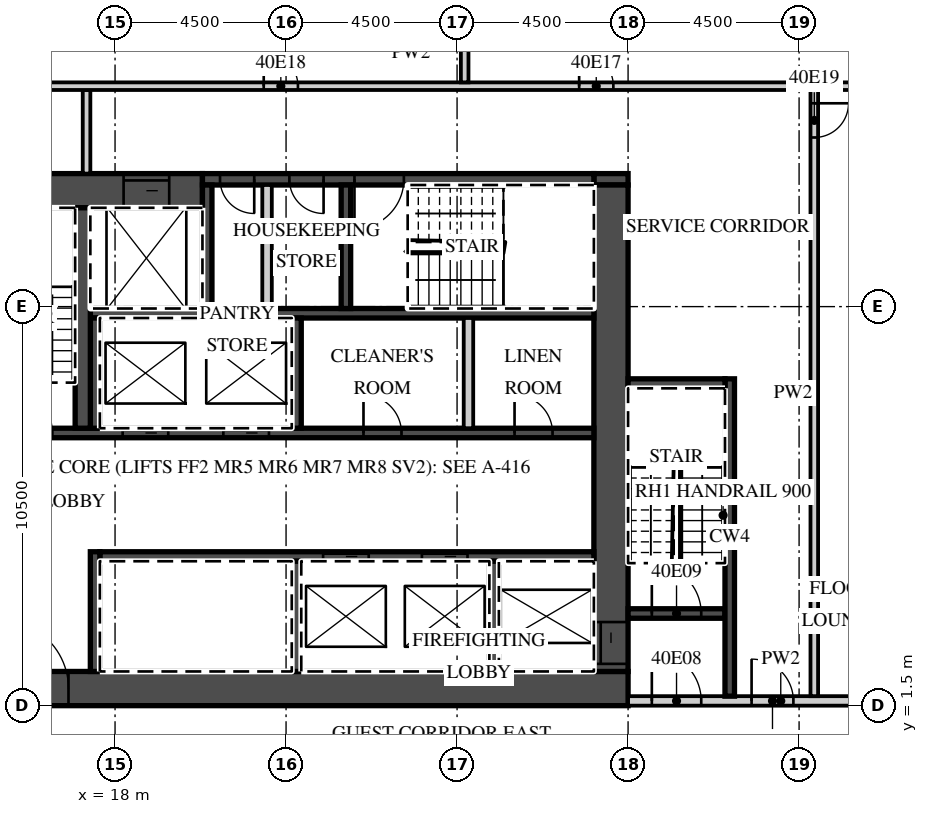
"""IFC4 building model, lengths in metres.
Left out: names, types, materials, properties, quantities, classifications, styles, units other than length and angle.
Written with IfcOpenShell. Run it as: python <this file> out.ifc"""

import sys

from ifc_helpers import new_model, si_unit, direction, frame, frame_2d, origin, place, context, subcontext, project, spatial, rectangle, extrude, element, fill, save


model = new_model("IFC4")
c1 = context("Model", 3, precision=1e-05, world=origin(), true_north=direction((0.0, 1.0)))
c2 = subcontext(c1, "Body", "Model", "MODEL_VIEW")
j1 = project(units=[si_unit("LENGTHUNIT", "METRE"), si_unit("PLANEANGLEUNIT", "RADIAN")], contexts=[c1])
p1 = place(None, origin())
s1 = spatial("IfcSite", under=j1, at=p1, CompositionType="ELEMENT")
p2 = place(p1, origin())
s2 = spatial("IfcBuilding", under=s1, at=p2, CompositionType="ELEMENT")
p3 = place(p2, frame((0.0, 0.0, 173.5)))
s3 = spatial("IfcBuildingStorey", under=s2, at=p3, CompositionType="ELEMENT", Elevation=173.5)
p4 = place(p3, frame((13.5, 1.95, 0.0), z_axis=(0.0, 0.0, 1.0), x_axis=(1.0, 0.0, 0.0)))
e1 = element("IfcWall", 1, at=p4, inside=s3, PredefinedType="SHEAR", context=c2, shape_type="SweptSolid", body=[
    extrude(rectangle(XDim=18.0, YDim=0.9, at=frame_2d((9.0, 0.0))), origin(), (0.0, 0.0, 1.0), 3.02),
])
p5 = place(p4, frame((1.475, 0.0, 0.0)))
e2 = element("IfcOpeningElement", 2, at=p5, cuts=e1, PredefinedType="OPENING", context=c2, shape_type="SweptSolid", body=[
    extrude(rectangle(XDim=1.8, YDim=2.1, at=frame_2d((0.9, 1.05))), frame((0.0, 0.46, 0.0), z_axis=(0.0, -1.0, 0.0), x_axis=(1.0, 0.0, 0.0)), (0.0, 0.0, 1.0), 0.92),
])
p6 = place(p3, frame((13.5, 15.05, 0.0), z_axis=(0.0, 0.0, 1.0), x_axis=(1.0, 0.0, 0.0)))
e3 = element("IfcWall", 3, at=p6, inside=s3, PredefinedType="SHEAR", context=c2, shape_type="SweptSolid", body=[
    extrude(rectangle(XDim=6.8, YDim=0.9, at=frame_2d((3.4, 0.0))), origin(), (0.0, 0.0, 1.0), 3.02),
])
p7 = place(p6, frame((4.725, 0.0, 0.0)))
e4 = element("IfcOpeningElement", 4, at=p7, cuts=e3, PredefinedType="OPENING", context=c2, shape_type="SweptSolid", body=[
    extrude(rectangle(XDim=1.2, YDim=2.1, at=frame_2d((0.6, 1.05))), frame((0.0, 0.46, 0.0), z_axis=(0.0, -1.0, 0.0), x_axis=(1.0, 0.0, 0.0)), (0.0, 0.0, 1.0), 0.92),
])
p8 = place(p3, frame((30.6, 15.35, 0.0), z_axis=(0.0, 0.0, 1.0), x_axis=(1.0, 0.0, 0.0)))
e5 = element("IfcWall", 5, at=p8, inside=s3, PredefinedType="SHEAR", context=c2, shape_type="SweptSolid", body=[
    extrude(rectangle(XDim=0.9, YDim=0.3, at=frame_2d((0.45, 0.0))), origin(), (0.0, 0.0, 1.0), 3.02),
])
p9 = place(p3, frame((20.3, 15.35, 0.0), z_axis=(0.0, 0.0, 1.0), x_axis=(1.0, 0.0, 0.0)))
e6 = element("IfcWall", 6, at=p9, inside=s3, PredefinedType="SHEAR", context=c2, shape_type="SweptSolid", body=[
    extrude(rectangle(XDim=10.3, YDim=0.3, at=frame_2d((5.15, 0.0))), origin(), (0.0, 0.0, 1.0), 3.02),
])
p10 = place(p9, frame((4.0, 0.0, 0.0)))
e7 = element("IfcOpeningElement", 7, at=p10, cuts=e6, PredefinedType="OPENING", context=c2, shape_type="SweptSolid", body=[
    extrude(rectangle(XDim=1.3, YDim=2.1, at=frame_2d((0.65, 1.05))), frame((0.0, 0.16, 0.0), z_axis=(0.0, -1.0, 0.0), x_axis=(1.0, 0.0, 0.0)), (0.0, 0.0, 1.0), 0.32),
])
p11 = place(p9, frame((2.288, 0.0, 0.0)))
e8 = element("IfcOpeningElement", 8, at=p11, cuts=e6, PredefinedType="OPENING", context=c2, shape_type="SweptSolid", body=[
    extrude(rectangle(XDim=0.9, YDim=2.1, at=frame_2d((0.45, 1.05))), frame((0.0, 0.16, 0.0), z_axis=(0.0, -1.0, 0.0), x_axis=(1.0, 0.0, 0.0)), (0.0, 0.0, 1.0), 0.32),
])
p12 = place(p9, frame((0.462, 0.0, 0.0)))
e9 = element("IfcOpeningElement", 9, at=p12, cuts=e6, PredefinedType="OPENING", context=c2, shape_type="SweptSolid", body=[
    extrude(rectangle(XDim=0.9, YDim=2.1, at=frame_2d((0.45, 1.05))), frame((0.0, 0.16, 0.0), z_axis=(0.0, -1.0, 0.0), x_axis=(1.0, 0.0, 0.0)), (0.0, 0.0, 1.0), 0.32),
])
p13 = place(p3, frame((31.05, 2.4, 0.0), z_axis=(0.0, 0.0, 1.0), x_axis=(0.0, 1.0, 0.0)))
e10 = element("IfcWall", 10, at=p13, inside=s3, PredefinedType="SHEAR", context=c2, shape_type="SweptSolid", body=[
    extrude(rectangle(XDim=12.8, YDim=0.9, at=frame_2d((6.4, 0.0))), origin(), (0.0, 0.0, 1.0), 3.02),
])
p14 = place(p13, frame((0.2, 0.0, 0.0)))
e11 = element("IfcOpeningElement", 11, at=p14, cuts=e10, PredefinedType="OPENING", context=c2, shape_type="SweptSolid", body=[
    extrude(rectangle(XDim=1.1, YDim=2.1, at=frame_2d((0.55, 1.05))), frame((0.0, 0.46, 0.0), z_axis=(0.0, -1.0, 0.0), x_axis=(1.0, 0.0, 0.0)), (0.0, 0.0, 1.0), 0.92),
])
p15 = place(p3, frame((17.6, 5.425, 0.0), z_axis=(0.0, 0.0, 1.0), x_axis=(1.0, 0.0, 0.0)))
e12 = element("IfcWall", 12, at=p15, inside=s3, PredefinedType="SHEAR", context=c2, shape_type="SweptSolid", body=[
    extrude(rectangle(XDim=13.0, YDim=0.25, at=frame_2d((6.5, 0.0))), origin(), (0.0, 0.0, 1.0), 3.02),
])
p16 = place(p15, frame((8.475, 0.0, 0.0)))
e13 = element("IfcOpeningElement", 13, at=p16, cuts=e12, PredefinedType="OPENING", context=c2, shape_type="SweptSolid", body=[
    extrude(rectangle(XDim=1.2, YDim=2.1, at=frame_2d((0.6, 1.05))), frame((0.0, 0.135, 0.0), z_axis=(0.0, -1.0, 0.0), x_axis=(1.0, 0.0, 0.0)), (0.0, 0.0, 1.0), 0.27),
])
p17 = place(p15, frame((5.875, 0.0, 0.0)))
e14 = element("IfcOpeningElement", 14, at=p17, cuts=e12, PredefinedType="OPENING", context=c2, shape_type="SweptSolid", body=[
    extrude(rectangle(XDim=1.2, YDim=2.1, at=frame_2d((0.6, 1.05))), frame((0.0, 0.135, 0.0), z_axis=(0.0, -1.0, 0.0), x_axis=(1.0, 0.0, 0.0)), (0.0, 0.0, 1.0), 0.27),
])
p18 = place(p3, frame((17.475, 2.4, 0.0), z_axis=(0.0, 0.0, 1.0), x_axis=(0.0, 1.0, 0.0)))
e15 = element("IfcWall", 15, at=p18, inside=s3, PredefinedType="SHEAR", context=c2, shape_type="SweptSolid", body=[
    extrude(rectangle(XDim=3.15, YDim=0.25, at=frame_2d((1.575, 0.0))), origin(), (0.0, 0.0, 1.0), 3.02),
])
for number, where, z_axis, x_axis in (
    (16, (27.975, 2.4, 0.0), (0.0, 0.0, 1.0), (0.0, 1.0, 0.0)),
    (17, (22.775, 2.4, 0.0), (0.0, 0.0, 1.0), (0.0, 1.0, 0.0)),
):
    element("IfcWall", number, at=place(p3, frame(where, z_axis=z_axis, x_axis=x_axis)), inside=s3, PredefinedType="SHEAR", context=c2, shape_type="SweptSolid", body=[
        extrude(rectangle(XDim=2.9, YDim=0.25, at=frame_2d((1.45, 0.0))), origin(), (0.0, 0.0, 1.0), 3.02),
    ])
p19 = place(p3, frame((14.4, 8.675, 0.0), z_axis=(0.0, 0.0, 1.0), x_axis=(1.0, 0.0, 0.0)))
e18 = element("IfcWall", 18, at=p19, inside=s3, PredefinedType="SHEAR", context=c2, shape_type="SweptSolid", body=[
    extrude(rectangle(XDim=16.2, YDim=0.25, at=frame_2d((8.1, 0.0))), origin(), (0.0, 0.0, 1.0), 3.02),
])
p20 = place(p19, frame((6.45, 0.0, 0.0)))
e19 = element("IfcOpeningElement", 19, at=p20, cuts=e18, PredefinedType="OPENING", context=c2, shape_type="SweptSolid", body=[
    extrude(rectangle(XDim=1.2, YDim=2.1, at=frame_2d((0.6, 1.05))), frame((0.0, 0.135, 0.0), z_axis=(0.0, -1.0, 0.0), x_axis=(1.0, 0.0, 0.0)), (0.0, 0.0, 1.0), 0.27),
])
p21 = place(p19, frame((3.8, 0.0, 0.0)))
e20 = element("IfcOpeningElement", 20, at=p21, cuts=e18, PredefinedType="OPENING", context=c2, shape_type="SweptSolid", body=[
    extrude(rectangle(XDim=1.2, YDim=2.1, at=frame_2d((0.6, 1.05))), frame((0.0, 0.135, 0.0), z_axis=(0.0, -1.0, 0.0), x_axis=(1.0, 0.0, 0.0)), (0.0, 0.0, 1.0), 0.27),
])
p22 = place(p19, frame((0.65, 0.0, 0.0)))
e21 = element("IfcOpeningElement", 21, at=p22, cuts=e18, PredefinedType="OPENING", context=c2, shape_type="SweptSolid", body=[
    extrude(rectangle(XDim=1.3, YDim=2.1, at=frame_2d((0.65, 1.05))), frame((0.0, 0.135, 0.0), z_axis=(0.0, -1.0, 0.0), x_axis=(1.0, 0.0, 0.0)), (0.0, 0.0, 1.0), 0.27),
])
p23 = place(p19, frame((14.113, 0.0, 0.0)))
e22 = element("IfcOpeningElement", 22, at=p23, cuts=e18, PredefinedType="OPENING", context=c2, shape_type="SweptSolid", body=[
    extrude(rectangle(XDim=1.0, YDim=2.1, at=frame_2d((0.5, 1.05))), frame((0.0, 0.135, 0.0), z_axis=(0.0, -1.0, 0.0), x_axis=(1.0, 0.0, 0.0)), (0.0, 0.0, 1.0), 0.27),
])
p24 = place(p19, frame((10.137, 0.0, 0.0)))
e23 = element("IfcOpeningElement", 23, at=p24, cuts=e18, PredefinedType="OPENING", context=c2, shape_type="SweptSolid", body=[
    extrude(rectangle(XDim=1.0, YDim=2.1, at=frame_2d((0.5, 1.05))), frame((0.0, 0.135, 0.0), z_axis=(0.0, -1.0, 0.0), x_axis=(1.0, 0.0, 0.0)), (0.0, 0.0, 1.0), 0.27),
])
p25 = place(p3, frame((17.35, 11.825, 0.0), z_axis=(0.0, 0.0, 1.0), x_axis=(1.0, 0.0, 0.0)))
e24 = element("IfcWall", 24, at=p25, inside=s3, PredefinedType="SHEAR", context=c2, shape_type="SweptSolid", body=[
    extrude(rectangle(XDim=13.25, YDim=0.25, at=frame_2d((6.625, 0.0))), origin(), (0.0, 0.0, 1.0), 3.02),
])
for number, where, z_axis, x_axis in (
    (25, (17.475, 8.8, 0.0), (0.0, 0.0, 1.0), (0.0, 1.0, 0.0)),
    (26, (22.775, 8.8, 0.0), (0.0, 0.0, 1.0), (0.0, 1.0, 0.0)),
):
    element("IfcWall", number, at=place(p3, frame(where, z_axis=z_axis, x_axis=x_axis)), inside=s3, PredefinedType="SHEAR", context=c2, shape_type="SweptSolid", body=[
        extrude(rectangle(XDim=2.9, YDim=0.25, at=frame_2d((1.45, 0.0))), origin(), (0.0, 0.0, 1.0), 3.02),
    ])
p26 = place(p3, frame((27.3, 8.8, 0.0), z_axis=(0.0, 0.0, 1.0), x_axis=(0.0, 1.0, 0.0)))
e27 = element("IfcWall", 27, at=p26, inside=s3, PredefinedType="PARTITIONING", context=c2, shape_type="SweptSolid", body=[
    extrude(rectangle(XDim=2.9, YDim=0.25, at=frame_2d((1.45, 0.0))), origin(), (0.0, 0.0, 1.0), 3.02),
])
p27 = place(p3, frame((17.15, 8.8, 0.0), z_axis=(0.0, 0.0, 1.0), x_axis=(0.0, 1.0, 0.0)))
e28 = element("IfcWall", 28, at=p27, inside=s3, PredefinedType="SHEAR", context=c2, shape_type="SweptSolid", body=[
    extrude(rectangle(XDim=5.8, YDim=0.4, at=frame_2d((2.9, 0.0))), origin(), (0.0, 0.0, 1.0), 3.02),
])
for number, where, z_axis, x_axis in (
    (29, (20.425, 11.95, 0.0), (0.0, 0.0, 1.0), (0.0, 1.0, 0.0)),
    (30, (24.075, 11.95, 0.0), (0.0, 0.0, 1.0), (0.0, 1.0, 0.0)),
):
    element("IfcWall", number, at=place(p3, frame(where, z_axis=z_axis, x_axis=x_axis)), inside=s3, PredefinedType="SHEAR", context=c2, shape_type="SweptSolid", body=[
        extrude(rectangle(XDim=3.25, YDim=0.25, at=frame_2d((1.625, 0.0))), origin(), (0.0, 0.0, 1.0), 3.02),
    ])
p28 = place(p3, frame((22.0, 11.95, 0.0), z_axis=(0.0, 0.0, 1.0), x_axis=(0.0, 1.0, 0.0)))
e31 = element("IfcWall", 31, at=p28, inside=s3, PredefinedType="PARTITIONING", context=c2, shape_type="SweptSolid", body=[
    extrude(rectangle(XDim=3.25, YDim=0.25, at=frame_2d((1.625, 0.0))), origin(), (0.0, 0.0, 1.0), 3.02),
])
p29 = place(p3, frame((31.5, 1.625, 0.0), z_axis=(0.0, 0.0, 1.0), x_axis=(1.0, 0.0, 0.0)))
e32 = element("IfcWall", 32, at=p29, inside=s3, PredefinedType="PARTITIONING", context=c2, shape_type="SweptSolid", body=[
    extrude(rectangle(XDim=8.035, YDim=0.25, at=frame_2d((4.018, 0.0))), origin(), (0.0, 0.0, 1.0), 3.02),
])
p30 = place(p29, frame((0.625, 0.0, 0.0)))
e33 = element("IfcOpeningElement", 33, at=p30, cuts=e32, PredefinedType="OPENING", context=c2, shape_type="SweptSolid", body=[
    extrude(rectangle(XDim=1.3, YDim=2.1, at=frame_2d((0.65, 1.05))), frame((0.0, 0.135, 0.0), z_axis=(0.0, -1.0, 0.0), x_axis=(1.0, 0.0, 0.0)), (0.0, 0.0, 1.0), 0.27),
])
p31 = place(p29, frame((3.25, 0.0, 0.0)))
e34 = element("IfcOpeningElement", 34, at=p31, cuts=e32, PredefinedType="OPENING", context=c2, shape_type="SweptSolid", body=[
    extrude(rectangle(XDim=1.1, YDim=2.1, at=frame_2d((0.55, 1.05))), frame((0.0, 0.135, 0.0), z_axis=(0.0, -1.0, 0.0), x_axis=(1.0, 0.0, 0.0)), (0.0, 0.0, 1.0), 0.27),
])
p32 = place(p3, frame((31.5, 3.925, 0.0), z_axis=(0.0, 0.0, 1.0), x_axis=(1.0, 0.0, 0.0)))
e35 = element("IfcWall", 35, at=p32, inside=s3, PredefinedType="SHEAR", context=c2, shape_type="SweptSolid", body=[
    extrude(rectangle(XDim=2.55, YDim=0.25, at=frame_2d((1.275, 0.0))), origin(), (0.0, 0.0, 1.0), 3.02),
])
p33 = place(p32, frame((0.625, 0.0, 0.0)))
e36 = element("IfcOpeningElement", 36, at=p33, cuts=e35, PredefinedType="OPENING", context=c2, shape_type="SweptSolid", body=[
    extrude(rectangle(XDim=1.3, YDim=2.1, at=frame_2d((0.65, 1.05))), frame((0.0, 0.135, 0.0), z_axis=(0.0, -1.0, 0.0), x_axis=(1.0, 0.0, 0.0)), (0.0, 0.0, 1.0), 0.27),
])
p34 = place(p3, frame((34.175, 1.75, 0.0), z_axis=(0.0, 0.0, 1.0), x_axis=(0.0, 1.0, 0.0)))
e37 = element("IfcWall", 37, at=p34, inside=s3, PredefinedType="SHEAR", context=c2, shape_type="SweptSolid", body=[
    extrude(rectangle(XDim=8.35, YDim=0.25, at=frame_2d((4.175, 0.0))), origin(), (0.0, 0.0, 1.0), 3.02),
])
p35 = place(p3, frame((31.5, 9.975, 0.0), z_axis=(0.0, 0.0, 1.0), x_axis=(1.0, 0.0, 0.0)))
e38 = element("IfcWall", 38, at=p35, inside=s3, PredefinedType="SHEAR", context=c2, shape_type="SweptSolid", body=[
    extrude(rectangle(XDim=2.55, YDim=0.25, at=frame_2d((1.275, 0.0))), origin(), (0.0, 0.0, 1.0), 3.02),
])
p36 = place(p3, frame((17.25, 15.5, 0.0), z_axis=(0.0, 0.0, 1.0), x_axis=(0.0, 1.0, 0.0)))
e39 = element("IfcWall", 39, at=p36, inside=s3, PredefinedType="PARTITIONING", context=c2, shape_type="SweptSolid", body=[
    extrude(rectangle(XDim=2.2, YDim=0.2, at=frame_2d((1.1, 0.0))), origin(), (0.0, 0.0, 1.0), 3.02),
])
p37 = place(p3, frame((36.4, 1.75, 0.0), z_axis=(0.0, 0.0, 1.0), x_axis=(0.0, 1.0, 0.0)))
e40 = element("IfcWall", 40, at=p37, inside=s3, PredefinedType="PARTITIONING", context=c2, shape_type="SweptSolid", body=[
    extrude(rectangle(XDim=15.95, YDim=0.2, at=frame_2d((7.975, 0.0))), origin(), (0.0, 0.0, 1.0), 3.02),
])
p38 = place(p37, frame((14.7, 0.0, 0.0)))
e41 = element("IfcOpeningElement", 41, at=p38, cuts=e40, PredefinedType="OPENING", context=c2, shape_type="SweptSolid", body=[
    extrude(rectangle(XDim=0.9, YDim=2.1, at=frame_2d((0.45, 1.05))), frame((0.0, 0.11, 0.0), z_axis=(0.0, -1.0, 0.0), x_axis=(1.0, 0.0, 0.0)), (0.0, 0.0, 1.0), 0.22),
])
p39 = place(p3, frame((13.6, 17.8, 0.0), z_axis=(0.0, 0.0, 1.0), x_axis=(1.0, 0.0, 0.0)))
e42 = element("IfcWall", 42, at=p39, inside=s3, PredefinedType="PARTITIONING", context=c2, shape_type="SweptSolid", body=[
    extrude(rectangle(XDim=24.378, YDim=0.2, at=frame_2d((12.189, 0.0))), origin(), (0.0, 0.0, 1.0), 3.02),
])
p40 = place(p39, frame((16.613, 0.0, 0.0)))
e43 = element("IfcOpeningElement", 43, at=p40, cuts=e42, PredefinedType="OPENING", context=c2, shape_type="SweptSolid", body=[
    extrude(rectangle(XDim=0.9, YDim=2.1, at=frame_2d((0.45, 1.05))), frame((0.0, 0.11, 0.0), z_axis=(0.0, -1.0, 0.0), x_axis=(1.0, 0.0, 0.0)), (0.0, 0.0, 1.0), 0.22),
])
p41 = place(p39, frame((8.312, 0.0, 0.0)))
e44 = element("IfcOpeningElement", 44, at=p41, cuts=e42, PredefinedType="OPENING", context=c2, shape_type="SweptSolid", body=[
    extrude(rectangle(XDim=0.9, YDim=2.1, at=frame_2d((0.45, 1.05))), frame((0.0, 0.11, 0.0), z_axis=(0.0, -1.0, 0.0), x_axis=(1.0, 0.0, 0.0)), (0.0, 0.0, 1.0), 0.22),
])
p42 = place(p3, frame((27.2, 17.9, 0.0), z_axis=(0.0, 0.0, 1.0), x_axis=(0.0, 1.0, 0.0)))
e45 = element("IfcWall", 45, at=p42, inside=s3, PredefinedType="PARTITIONING", context=c2, shape_type="SweptSolid", body=[
    extrude(rectangle(XDim=5.01, YDim=0.2, at=frame_2d((2.505, 0.0))), origin(), (0.0, 0.0, 1.0), 3.02),
])
p43 = place(p20, origin())
e46 = element("IfcDoor", 46, at=p43, inside=s3, OperationType="SLIDING_TO_LEFT", PredefinedType="DOOR", context=c2, shape_type="SweptSolid", body=[
    extrude(rectangle(XDim=1.2, YDim=2.1, at=frame_2d((0.6, 1.05))), frame((0.0, 0.025, 0.0), z_axis=(0.0, -1.0, 0.0), x_axis=(1.0, 0.0, 0.0)), (0.0, 0.0, 1.0), 0.05),
])
fill(e19, e46)
p44 = place(p21, origin())
e47 = element("IfcDoor", 47, at=p44, inside=s3, OperationType="SLIDING_TO_RIGHT", PredefinedType="DOOR", context=c2, shape_type="SweptSolid", body=[
    extrude(rectangle(XDim=1.2, YDim=2.1, at=frame_2d((0.6, 1.05))), frame((0.0, 0.025, 0.0), z_axis=(0.0, -1.0, 0.0), x_axis=(1.0, 0.0, 0.0)), (0.0, 0.0, 1.0), 0.05),
])
fill(e20, e47)
p45 = place(p16, origin())
e48 = element("IfcDoor", 48, at=p45, inside=s3, OperationType="SLIDING_TO_LEFT", PredefinedType="DOOR", context=c2, shape_type="SweptSolid", body=[
    extrude(rectangle(XDim=1.2, YDim=2.1, at=frame_2d((0.6, 1.05))), frame((0.0, 0.025, 0.0), z_axis=(0.0, -1.0, 0.0), x_axis=(1.0, 0.0, 0.0)), (0.0, 0.0, 1.0), 0.05),
])
fill(e13, e48)
p46 = place(p17, origin())
e49 = element("IfcDoor", 49, at=p46, inside=s3, OperationType="SLIDING_TO_RIGHT", PredefinedType="DOOR", context=c2, shape_type="SweptSolid", body=[
    extrude(rectangle(XDim=1.2, YDim=2.1, at=frame_2d((0.6, 1.05))), frame((0.0, 0.025, 0.0), z_axis=(0.0, -1.0, 0.0), x_axis=(1.0, 0.0, 0.0)), (0.0, 0.0, 1.0), 0.05),
])
fill(e14, e49)
p47 = place(p7, origin())
e50 = element("IfcDoor", 50, at=p47, inside=s3, OperationType="SLIDING_TO_LEFT", PredefinedType="DOOR", context=c2, shape_type="SweptSolid", body=[
    extrude(rectangle(XDim=1.2, YDim=2.1, at=frame_2d((0.6, 1.05))), frame((0.0, 0.025, 0.0), z_axis=(0.0, -1.0, 0.0), x_axis=(1.0, 0.0, 0.0)), (0.0, 0.0, 1.0), 0.05),
])
fill(e4, e50)
p48 = place(p14, origin())
e51 = element("IfcDoor", 51, at=p48, inside=s3, OperationType="SLIDING_TO_LEFT", PredefinedType="DOOR", context=c2, shape_type="SweptSolid", body=[
    extrude(rectangle(XDim=1.1, YDim=2.1, at=frame_2d((0.55, 1.05))), frame((0.0, 0.025, 0.0), z_axis=(0.0, -1.0, 0.0), x_axis=(1.0, 0.0, 0.0)), (0.0, 0.0, 1.0), 0.05),
])
fill(e11, e51)
p49 = place(p5, origin())
e52 = element("IfcDoor", 52, at=p49, inside=s3, OperationType="DOUBLE_DOOR_DOUBLE_SWING", PredefinedType="DOOR", context=c2, shape_type="SweptSolid", body=[
    extrude(rectangle(XDim=1.8, YDim=2.1, at=frame_2d((0.9, 1.05))), frame((0.0, 0.025, 0.0), z_axis=(0.0, -1.0, 0.0), x_axis=(1.0, 0.0, 0.0)), (0.0, 0.0, 1.0), 0.05),
])
fill(e2, e52)
p50 = place(p30, origin())
e53 = element("IfcDoor", 53, at=p50, inside=s3, OperationType="SINGLE_SWING_LEFT", PredefinedType="DOOR", context=c2, shape_type="SweptSolid", body=[
    extrude(rectangle(XDim=1.3, YDim=2.1, at=frame_2d((0.65, 1.05))), frame((0.0, 0.025, 0.0), z_axis=(0.0, -1.0, 0.0), x_axis=(1.0, 0.0, 0.0)), (0.0, 0.0, 1.0), 0.05),
])
fill(e33, e53)
p51 = place(p33, origin())
e54 = element("IfcDoor", 54, at=p51, inside=s3, OperationType="SINGLE_SWING_LEFT", PredefinedType="DOOR", context=c2, shape_type="SweptSolid", body=[
    extrude(rectangle(XDim=1.3, YDim=2.1, at=frame_2d((0.65, 1.05))), frame((0.0, 0.025, 0.0), z_axis=(0.0, -1.0, 0.0), x_axis=(1.0, 0.0, 0.0)), (0.0, 0.0, 1.0), 0.05),
])
fill(e36, e54)
p52 = place(p31, origin())
e55 = element("IfcDoor", 55, at=p52, inside=s3, OperationType="SINGLE_SWING_LEFT", PredefinedType="DOOR", context=c2, shape_type="SweptSolid", body=[
    extrude(rectangle(XDim=1.1, YDim=2.1, at=frame_2d((0.55, 1.05))), frame((0.0, 0.025, 0.0), z_axis=(0.0, -1.0, 0.0), x_axis=(1.0, 0.0, 0.0)), (0.0, 0.0, 1.0), 0.05),
])
fill(e34, e55)
p53 = place(p10, origin())
e56 = element("IfcDoor", 56, at=p53, inside=s3, OperationType="SINGLE_SWING_LEFT", PredefinedType="DOOR", context=c2, shape_type="SweptSolid", body=[
    extrude(rectangle(XDim=1.3, YDim=2.1, at=frame_2d((0.65, 1.05))), frame((0.0, 0.025, 0.0), z_axis=(0.0, -1.0, 0.0), x_axis=(1.0, 0.0, 0.0)), (0.0, 0.0, 1.0), 0.05),
])
fill(e7, e56)
p54 = place(p11, origin())
e57 = element("IfcDoor", 57, at=p54, inside=s3, OperationType="SINGLE_SWING_RIGHT", PredefinedType="DOOR", context=c2, shape_type="SweptSolid", body=[
    extrude(rectangle(XDim=0.9, YDim=2.1, at=frame_2d((0.45, 1.05))), frame((0.0, 0.025, 0.0), z_axis=(0.0, -1.0, 0.0), x_axis=(1.0, 0.0, 0.0)), (0.0, 0.0, 1.0), 0.05),
])
fill(e8, e57)
p55 = place(p12, origin())
e58 = element("IfcDoor", 58, at=p55, inside=s3, OperationType="SINGLE_SWING_RIGHT", PredefinedType="DOOR", context=c2, shape_type="SweptSolid", body=[
    extrude(rectangle(XDim=0.9, YDim=2.1, at=frame_2d((0.45, 1.05))), frame((0.0, 0.025, 0.0), z_axis=(0.0, -1.0, 0.0), x_axis=(1.0, 0.0, 0.0)), (0.0, 0.0, 1.0), 0.05),
])
fill(e9, e58)
p56 = place(p23, origin())
e59 = element("IfcDoor", 59, at=p56, inside=s3, OperationType="SINGLE_SWING_LEFT", PredefinedType="DOOR", context=c2, shape_type="SweptSolid", body=[
    extrude(rectangle(XDim=1.0, YDim=2.1, at=frame_2d((0.5, 1.05))), frame((0.0, 0.025, 0.0), z_axis=(0.0, -1.0, 0.0), x_axis=(1.0, 0.0, 0.0)), (0.0, 0.0, 1.0), 0.05),
])
fill(e22, e59)
p57 = place(p24, origin())
e60 = element("IfcDoor", 60, at=p57, inside=s3, OperationType="SINGLE_SWING_LEFT", PredefinedType="DOOR", context=c2, shape_type="SweptSolid", body=[
    extrude(rectangle(XDim=1.0, YDim=2.1, at=frame_2d((0.5, 1.05))), frame((0.0, 0.025, 0.0), z_axis=(0.0, -1.0, 0.0), x_axis=(1.0, 0.0, 0.0)), (0.0, 0.0, 1.0), 0.05),
])
fill(e23, e60)
p58 = place(p40, origin())
e61 = element("IfcDoor", 61, at=p58, inside=s3, OperationType="SINGLE_SWING_LEFT", PredefinedType="DOOR", context=c2, shape_type="SweptSolid", body=[
    extrude(rectangle(XDim=0.9, YDim=2.1, at=frame_2d((0.45, 1.05))), frame((0.0, 0.025, 0.0), z_axis=(0.0, -1.0, 0.0), x_axis=(1.0, 0.0, 0.0)), (0.0, 0.0, 1.0), 0.05),
])
fill(e43, e61)
p59 = place(p41, origin())
e62 = element("IfcDoor", 62, at=p59, inside=s3, OperationType="SINGLE_SWING_LEFT", PredefinedType="DOOR", context=c2, shape_type="SweptSolid", body=[
    extrude(rectangle(XDim=0.9, YDim=2.1, at=frame_2d((0.45, 1.05))), frame((0.0, 0.025, 0.0), z_axis=(0.0, -1.0, 0.0), x_axis=(1.0, 0.0, 0.0)), (0.0, 0.0, 1.0), 0.05),
])
fill(e44, e62)
p60 = place(p38, origin())
e63 = element("IfcDoor", 63, at=p60, inside=s3, OperationType="SINGLE_SWING_RIGHT", PredefinedType="DOOR", context=c2, shape_type="SweptSolid", body=[
    extrude(rectangle(XDim=0.9, YDim=2.1, at=frame_2d((0.45, 1.05))), frame((0.0, 0.025, 0.0), z_axis=(0.0, -1.0, 0.0), x_axis=(1.0, 0.0, 0.0)), (0.0, 0.0, 1.0), 0.05),
])
fill(e41, e63)
save(model, sys.argv[1])
